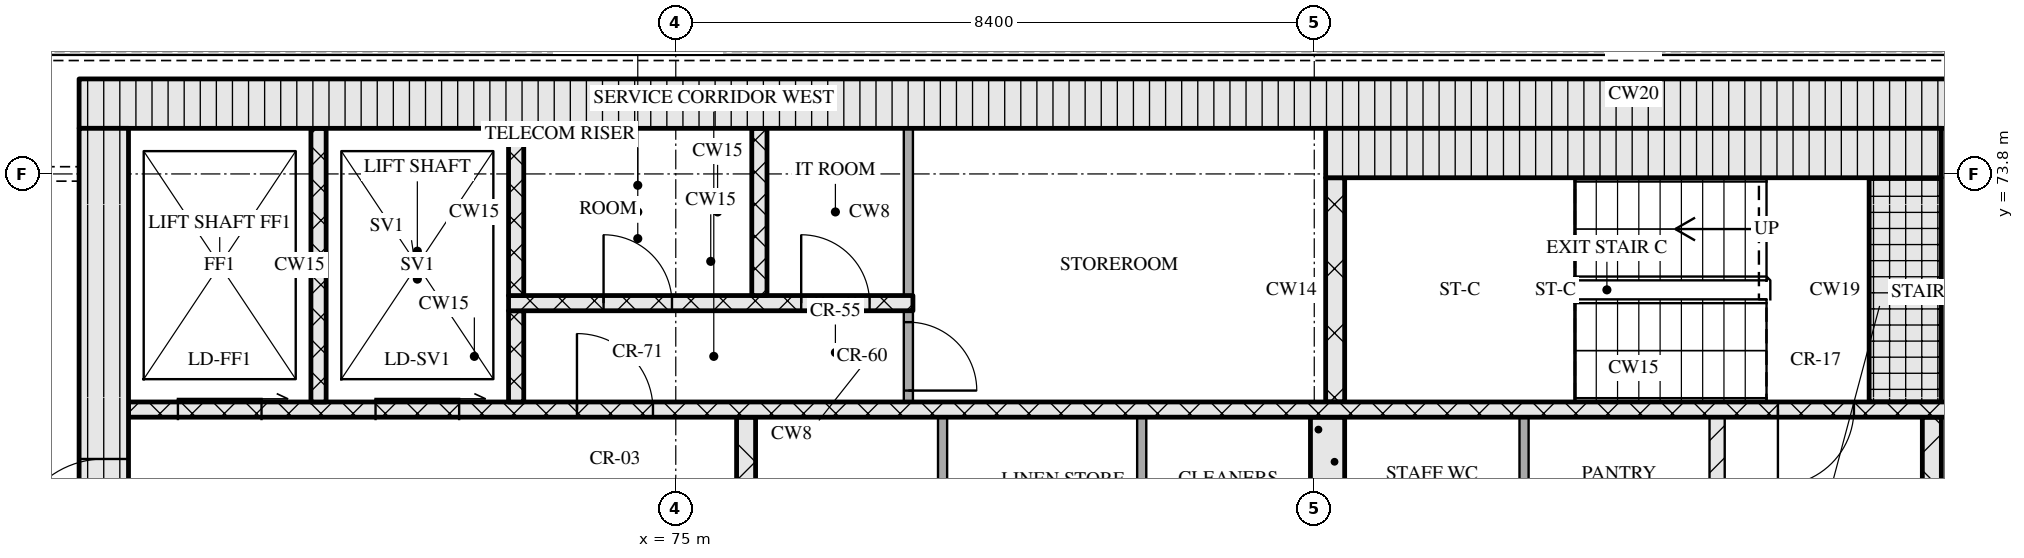
"""IFC4 building model, lengths in metres.
Left out: names, types, materials, properties, quantities, classifications, styles, units other than length and angle.
Written with IfcOpenShell. Run it as: python <this file> out.ifc"""

import sys

from ifc_helpers import new_model, si_unit, direction, frame, frame_2d, origin, place, context, subcontext, project, spatial, rectangle, extrude, element, fill, save


model = new_model("IFC4")
c1 = context("Model", 3, precision=1e-05, world=origin(), true_north=direction((0.0, 1.0)))
c2 = subcontext(c1, "Body", "Model", "MODEL_VIEW")
j1 = project(units=[si_unit("LENGTHUNIT", "METRE"), si_unit("PLANEANGLEUNIT", "RADIAN")], contexts=[c1])
p1 = place(None, origin())
s1 = spatial("IfcSite", under=j1, at=p1, CompositionType="ELEMENT")
p2 = place(p1, origin())
s2 = spatial("IfcBuilding", under=s1, at=p2, CompositionType="ELEMENT")
p3 = place(p2, frame((0.0, 0.0, 241.5)))
s3 = spatial("IfcBuildingStorey", under=s2, at=p3, CompositionType="ELEMENT", Elevation=241.5)
p4 = place(p3, frame((67.15, 74.725, 0.0), z_axis=(0.0, 0.0, 1.0), x_axis=(1.0, 0.0, 0.0)))
e1 = element("IfcWall", 1, at=p4, inside=s3, PredefinedType="SOLIDWALL", context=c2, shape_type="SweptSolid", body=[
    extrude(rectangle(XDim=40.9, YDim=0.65, at=frame_2d((20.45, 0.0))), origin(), (0.0, 0.0, 1.0), 3.32),
])
p5 = place(p3, frame((67.475, 62.4, 0.0), z_axis=(0.0, 0.0, 1.0), x_axis=(0.0, 1.0, 0.0)))
e2 = element("IfcWall", 2, at=p5, inside=s3, PredefinedType="SOLIDWALL", context=c2, shape_type="SweptSolid", body=[
    extrude(rectangle(XDim=12.0, YDim=0.65, at=frame_2d((6.0, 0.0))), origin(), (0.0, 0.0, 1.0), 3.32),
])
p6 = place(p5, frame((6.45, 0.0, 0.0)))
e3 = element("IfcOpeningElement", 3, at=p6, cuts=e2, PredefinedType="OPENING", context=c2, shape_type="SweptSolid", body=[
    extrude(rectangle(XDim=1.2, YDim=2.1, at=frame_2d((0.6, 1.05))), frame((0.0, 0.335, 0.0), z_axis=(0.0, -1.0, 0.0), x_axis=(1.0, 0.0, 0.0)), (0.0, 0.0, 1.0), 0.67),
])
for number, where, z_axis, x_axis in (
    (4, (78.51, 68.0, 0.0), (0.0, 0.0, 1.0), (0.0, 1.0, 0.0)),
    (5, (81.13, 68.0, 0.0), (0.0, 0.0, 1.0), (0.0, 1.0, 0.0)),
):
    element("IfcWall", number, at=place(p3, frame(where, z_axis=z_axis, x_axis=x_axis)), inside=s3, PredefinedType="PARTITIONING", context=c2, shape_type="SweptSolid", body=[
        extrude(rectangle(XDim=2.6, YDim=0.12, at=frame_2d((1.3, 0.0))), origin(), (0.0, 0.0, 1.0), 3.32),
    ])
p7 = place(p3, frame((83.575, 68.0, 0.0), z_axis=(0.0, 0.0, 1.0), x_axis=(0.0, 1.0, 0.0)))
e6 = element("IfcWall", 6, at=p7, inside=s3, PredefinedType="SOLIDWALL", context=c2, shape_type="SweptSolid", body=[
    extrude(rectangle(XDim=2.6, YDim=0.45, at=frame_2d((1.3, 0.0))), origin(), (0.0, 0.0, 1.0), 3.32),
])
p8 = place(p3, frame((86.16, 68.0, 0.0), z_axis=(0.0, 0.0, 1.0), x_axis=(0.0, 1.0, 0.0)))
e7 = element("IfcWall", 7, at=p8, inside=s3, PredefinedType="PARTITIONING", context=c2, shape_type="SweptSolid", body=[
    extrude(rectangle(XDim=2.6, YDim=0.12, at=frame_2d((1.3, 0.0))), origin(), (0.0, 0.0, 1.0), 3.32),
])
p9 = place(p3, frame((88.7, 68.0, 0.0), z_axis=(0.0, 0.0, 1.0), x_axis=(0.0, 1.0, 0.0)))
e8 = element("IfcWall", 8, at=p9, inside=s3, PredefinedType="PARTITIONING", context=c2, shape_type="SweptSolid", body=[
    extrude(rectangle(XDim=2.6, YDim=0.2, at=frame_2d((1.3, 0.0))), origin(), (0.0, 0.0, 1.0), 3.32),
])
p10 = place(p3, frame((91.525, 68.0, 0.0), z_axis=(0.0, 0.0, 1.0), x_axis=(0.0, 1.0, 0.0)))
e9 = element("IfcWall", 9, at=p10, inside=s3, PredefinedType="SOLIDWALL", context=c2, shape_type="SweptSolid", body=[
    extrude(rectangle(XDim=2.6, YDim=0.25, at=frame_2d((1.3, 0.0))), origin(), (0.0, 0.0, 1.0), 3.32),
])
p11 = place(p3, frame((75.925, 68.3, 0.0), z_axis=(0.0, 0.0, 1.0), x_axis=(0.0, 1.0, 0.0)))
e10 = element("IfcWall", 10, at=p11, inside=s3, PredefinedType="SOLIDWALL", context=c2, shape_type="SweptSolid", body=[
    extrude(rectangle(XDim=2.3, YDim=0.25, at=frame_2d((1.15, 0.0))), origin(), (0.0, 0.0, 1.0), 3.32),
])
p12 = place(p3, frame((67.8, 70.7, 0.0), z_axis=(0.0, 0.0, 1.0), x_axis=(1.0, 0.0, 0.0)))
e11 = element("IfcWall", 11, at=p12, inside=s3, PredefinedType="SOLIDWALL", context=c2, shape_type="SweptSolid", body=[
    extrude(rectangle(XDim=39.6, YDim=0.2, at=frame_2d((19.8, 0.0))), origin(), (0.0, 0.0, 1.0), 3.32),
])
p13 = place(p12, frame((0.65, 0.0, 0.0)))
e12 = element("IfcOpeningElement", 12, at=p13, cuts=e11, PredefinedType="OPENING", context=c2, shape_type="SweptSolid", body=[
    extrude(rectangle(XDim=1.1, YDim=2.1, at=frame_2d((0.55, 1.05))), frame((0.0, 0.11, 0.0), z_axis=(0.0, -1.0, 0.0), x_axis=(1.0, 0.0, 0.0)), (0.0, 0.0, 1.0), 0.22),
])
p14 = place(p12, frame((3.25, 0.0, 0.0)))
e13 = element("IfcOpeningElement", 13, at=p14, cuts=e11, PredefinedType="OPENING", context=c2, shape_type="SweptSolid", body=[
    extrude(rectangle(XDim=1.1, YDim=2.1, at=frame_2d((0.55, 1.05))), frame((0.0, 0.11, 0.0), z_axis=(0.0, -1.0, 0.0), x_axis=(1.0, 0.0, 0.0)), (0.0, 0.0, 1.0), 0.22),
])
p15 = place(p12, frame((5.9, 0.0, 0.0)))
e14 = element("IfcOpeningElement", 14, at=p15, cuts=e11, PredefinedType="OPENING", context=c2, shape_type="SweptSolid", body=[
    extrude(rectangle(XDim=1.0, YDim=2.1, at=frame_2d((0.5, 1.05))), frame((0.0, 0.11, 0.0), z_axis=(0.0, -1.0, 0.0), x_axis=(1.0, 0.0, 0.0)), (0.0, 0.0, 1.0), 0.22),
])
p16 = place(p12, frame((21.7, 0.0, 0.0)))
e15 = element("IfcOpeningElement", 15, at=p16, cuts=e11, PredefinedType="OPENING", context=c2, shape_type="SweptSolid", body=[
    extrude(rectangle(XDim=1.0, YDim=2.1, at=frame_2d((0.5, 1.05))), frame((0.0, 0.11, 0.0), z_axis=(0.0, -1.0, 0.0), x_axis=(1.0, 0.0, 0.0)), (0.0, 0.0, 1.0), 0.22),
])
p17 = place(p12, frame((32.7, 0.0, 0.0)))
e16 = element("IfcOpeningElement", 16, at=p17, cuts=e11, PredefinedType="OPENING", context=c2, shape_type="SweptSolid", body=[
    extrude(rectangle(XDim=1.0, YDim=2.1, at=frame_2d((0.5, 1.05))), frame((0.0, 0.11, 0.0), z_axis=(0.0, -1.0, 0.0), x_axis=(1.0, 0.0, 0.0)), (0.0, 0.0, 1.0), 0.22),
])
p18 = place(p12, frame((35.25, 0.0, 0.0)))
e17 = element("IfcOpeningElement", 17, at=p18, cuts=e11, PredefinedType="OPENING", context=c2, shape_type="SweptSolid", body=[
    extrude(rectangle(XDim=1.1, YDim=2.1, at=frame_2d((0.55, 1.05))), frame((0.0, 0.11, 0.0), z_axis=(0.0, -1.0, 0.0), x_axis=(1.0, 0.0, 0.0)), (0.0, 0.0, 1.0), 0.22),
])
p19 = place(p12, frame((37.85, 0.0, 0.0)))
e18 = element("IfcOpeningElement", 18, at=p19, cuts=e11, PredefinedType="OPENING", context=c2, shape_type="SweptSolid", body=[
    extrude(rectangle(XDim=1.1, YDim=2.1, at=frame_2d((0.55, 1.05))), frame((0.0, 0.11, 0.0), z_axis=(0.0, -1.0, 0.0), x_axis=(1.0, 0.0, 0.0)), (0.0, 0.0, 1.0), 0.22),
])
p20 = place(p3, frame((70.3, 70.8, 0.0), z_axis=(0.0, 0.0, 1.0), x_axis=(0.0, 1.0, 0.0)))
e19 = element("IfcWall", 19, at=p20, inside=s3, PredefinedType="SOLIDWALL", context=c2, shape_type="SweptSolid", body=[
    extrude(rectangle(XDim=3.6, YDim=0.2, at=frame_2d((1.8, 0.0))), origin(), (0.0, 0.0, 1.0), 3.32),
])
p21 = place(p3, frame((72.9, 70.8, 0.0), z_axis=(0.0, 0.0, 1.0), x_axis=(0.0, 1.0, 0.0)))
e20 = element("IfcWall", 20, at=p21, inside=s3, PredefinedType="SOLIDWALL", context=c2, shape_type="SweptSolid", body=[
    extrude(rectangle(XDim=1.2, YDim=0.2, at=frame_2d((0.6, 0.0))), origin(), (0.0, 0.0, 1.0), 3.32),
])
p22 = place(p3, frame((78.06, 70.8, 0.0), z_axis=(0.0, 0.0, 1.0), x_axis=(0.0, 1.0, 0.0)))
e21 = element("IfcWall", 21, at=p22, inside=s3, PredefinedType="PARTITIONING", context=c2, shape_type="SweptSolid", body=[
    extrude(rectangle(XDim=1.2, YDim=0.12, at=frame_2d((0.6, 0.0))), origin(), (0.0, 0.0, 1.0), 3.32),
])
p23 = place(p22, frame((0.15, 0.0, 0.0)))
e22 = element("IfcOpeningElement", 22, at=p23, cuts=e21, PredefinedType="OPENING", context=c2, shape_type="SweptSolid", body=[
    extrude(rectangle(XDim=0.9, YDim=2.1, at=frame_2d((0.45, 1.05))), frame((0.0, 0.07, 0.0), z_axis=(0.0, -1.0, 0.0), x_axis=(1.0, 0.0, 0.0)), (0.0, 0.0, 1.0), 0.14),
])
p24 = place(p3, frame((83.675, 70.8, 0.0), z_axis=(0.0, 0.0, 1.0), x_axis=(0.0, 1.0, 0.0)))
e23 = element("IfcWall", 23, at=p24, inside=s3, PredefinedType="SOLIDWALL", context=c2, shape_type="SweptSolid", body=[
    extrude(rectangle(XDim=2.95, YDim=0.25, at=frame_2d((1.475, 0.0))), origin(), (0.0, 0.0, 1.0), 3.32),
])
p25 = place(p3, frame((91.175, 70.8, 0.0), z_axis=(0.0, 0.0, 1.0), x_axis=(0.0, 1.0, 0.0)))
e24 = element("IfcWall", 24, at=p25, inside=s3, PredefinedType="SOLIDWALL", context=c2, shape_type="SweptSolid", body=[
    extrude(rectangle(XDim=2.95, YDim=0.95, at=frame_2d((1.475, 0.0))), origin(), (0.0, 0.0, 1.0), 3.32),
])
p26 = place(p3, frame((72.8, 72.1, 0.0), z_axis=(0.0, 0.0, 1.0), x_axis=(1.0, 0.0, 0.0)))
e25 = element("IfcWall", 25, at=p26, inside=s3, PredefinedType="SOLIDWALL", context=c2, shape_type="SweptSolid", body=[
    extrude(rectangle(XDim=5.32, YDim=0.2, at=frame_2d((2.66, 0.0))), origin(), (0.0, 0.0, 1.0), 3.32),
])
p27 = place(p26, frame((1.25, 0.0, 0.0)))
e26 = element("IfcOpeningElement", 26, at=p27, cuts=e25, PredefinedType="OPENING", context=c2, shape_type="SweptSolid", body=[
    extrude(rectangle(XDim=0.9, YDim=2.1, at=frame_2d((0.45, 1.05))), frame((0.0, 0.11, 0.0), z_axis=(0.0, -1.0, 0.0), x_axis=(1.0, 0.0, 0.0)), (0.0, 0.0, 1.0), 0.22),
])
p28 = place(p26, frame((3.85, 0.0, 0.0)))
e27 = element("IfcOpeningElement", 27, at=p28, cuts=e25, PredefinedType="OPENING", context=c2, shape_type="SweptSolid", body=[
    extrude(rectangle(XDim=0.9, YDim=2.1, at=frame_2d((0.45, 1.05))), frame((0.0, 0.11, 0.0), z_axis=(0.0, -1.0, 0.0), x_axis=(1.0, 0.0, 0.0)), (0.0, 0.0, 1.0), 0.22),
])
for number, where, z_axis, x_axis in (
    (28, (72.9, 72.2, 0.0), (0.0, 0.0, 1.0), (0.0, 1.0, 0.0)),
    (29, (76.1, 72.2, 0.0), (0.0, 0.0, 1.0), (0.0, 1.0, 0.0)),
):
    element("IfcWall", number, at=place(p3, frame(where, z_axis=z_axis, x_axis=x_axis)), inside=s3, PredefinedType="SOLIDWALL", context=c2, shape_type="SweptSolid", body=[
        extrude(rectangle(XDim=2.2, YDim=0.2, at=frame_2d((1.1, 0.0))), origin(), (0.0, 0.0, 1.0), 3.32),
    ])
p29 = place(p3, frame((78.06, 72.2, 0.0), z_axis=(0.0, 0.0, 1.0), x_axis=(0.0, 1.0, 0.0)))
e30 = element("IfcWall", 30, at=p29, inside=s3, PredefinedType="PARTITIONING", context=c2, shape_type="SweptSolid", body=[
    extrude(rectangle(XDim=2.2, YDim=0.12, at=frame_2d((1.1, 0.0))), origin(), (0.0, 0.0, 1.0), 3.32),
])
p30 = place(p3, frame((83.55, 74.075, 0.0), z_axis=(0.0, 0.0, 1.0), x_axis=(1.0, 0.0, 0.0)))
e31 = element("IfcWall", 31, at=p30, inside=s3, PredefinedType="SOLIDWALL", context=c2, shape_type="SweptSolid", body=[
    extrude(rectangle(XDim=8.1, YDim=0.65, at=frame_2d((4.05, 0.0))), origin(), (0.0, 0.0, 1.0), 3.32),
])
p31 = place(p6, origin())
e32 = element("IfcDoor", 32, at=p31, inside=s3, OperationType="SINGLE_SWING_LEFT", PredefinedType="DOOR", context=c2, shape_type="SweptSolid", body=[
    extrude(rectangle(XDim=1.2, YDim=2.1, at=frame_2d((0.6, 1.05))), frame((0.0, 0.025, 0.0), z_axis=(0.0, -1.0, 0.0), x_axis=(1.0, 0.0, 0.0)), (0.0, 0.0, 1.0), 0.05),
])
fill(e3, e32)
p32 = place(p13, origin())
e33 = element("IfcDoor", 33, at=p32, inside=s3, OperationType="SLIDING_TO_RIGHT", PredefinedType="DOOR", context=c2, shape_type="SweptSolid", body=[
    extrude(rectangle(XDim=1.1, YDim=2.1, at=frame_2d((0.55, 1.05))), frame((0.0, 0.025, 0.0), z_axis=(0.0, -1.0, 0.0), x_axis=(1.0, 0.0, 0.0)), (0.0, 0.0, 1.0), 0.05),
])
fill(e12, e33)
p33 = place(p14, origin())
e34 = element("IfcDoor", 34, at=p33, inside=s3, OperationType="SLIDING_TO_RIGHT", PredefinedType="DOOR", context=c2, shape_type="SweptSolid", body=[
    extrude(rectangle(XDim=1.1, YDim=2.1, at=frame_2d((0.55, 1.05))), frame((0.0, 0.025, 0.0), z_axis=(0.0, -1.0, 0.0), x_axis=(1.0, 0.0, 0.0)), (0.0, 0.0, 1.0), 0.05),
])
fill(e13, e34)
p34 = place(p15, origin())
e35 = element("IfcDoor", 35, at=p34, inside=s3, OperationType="SINGLE_SWING_LEFT", PredefinedType="DOOR", context=c2, shape_type="SweptSolid", body=[
    extrude(rectangle(XDim=1.0, YDim=2.1, at=frame_2d((0.5, 1.05))), frame((0.0, 0.025, 0.0), z_axis=(0.0, -1.0, 0.0), x_axis=(1.0, 0.0, 0.0)), (0.0, 0.0, 1.0), 0.05),
])
fill(e14, e35)
p35 = place(p16, origin())
e36 = element("IfcDoor", 36, at=p35, inside=s3, OperationType="SINGLE_SWING_RIGHT", PredefinedType="DOOR", context=c2, shape_type="SweptSolid", body=[
    extrude(rectangle(XDim=1.0, YDim=2.1, at=frame_2d((0.5, 1.05))), frame((0.0, 0.025, 0.0), z_axis=(0.0, -1.0, 0.0), x_axis=(1.0, 0.0, 0.0)), (0.0, 0.0, 1.0), 0.05),
])
fill(e15, e36)
p36 = place(p23, origin())
e37 = element("IfcDoor", 37, at=p36, inside=s3, OperationType="SINGLE_SWING_RIGHT", PredefinedType="DOOR", context=c2, shape_type="SweptSolid", body=[
    extrude(rectangle(XDim=0.9, YDim=2.1, at=frame_2d((0.45, 1.05))), frame((0.0, 0.025, 0.0), z_axis=(0.0, -1.0, 0.0), x_axis=(1.0, 0.0, 0.0)), (0.0, 0.0, 1.0), 0.05),
])
fill(e22, e37)
p37 = place(p27, origin())
e38 = element("IfcDoor", 38, at=p37, inside=s3, OperationType="SINGLE_SWING_LEFT", PredefinedType="DOOR", context=c2, shape_type="SweptSolid", body=[
    extrude(rectangle(XDim=0.9, YDim=2.1, at=frame_2d((0.45, 1.05))), frame((0.0, 0.025, 0.0), z_axis=(0.0, -1.0, 0.0), x_axis=(1.0, 0.0, 0.0)), (0.0, 0.0, 1.0), 0.05),
])
fill(e26, e38)
p38 = place(p28, origin())
e39 = element("IfcDoor", 39, at=p38, inside=s3, OperationType="SINGLE_SWING_LEFT", PredefinedType="DOOR", context=c2, shape_type="SweptSolid", body=[
    extrude(rectangle(XDim=0.9, YDim=2.1, at=frame_2d((0.45, 1.05))), frame((0.0, 0.025, 0.0), z_axis=(0.0, -1.0, 0.0), x_axis=(1.0, 0.0, 0.0)), (0.0, 0.0, 1.0), 0.05),
])
fill(e27, e39)
save(model, sys.argv[1])
